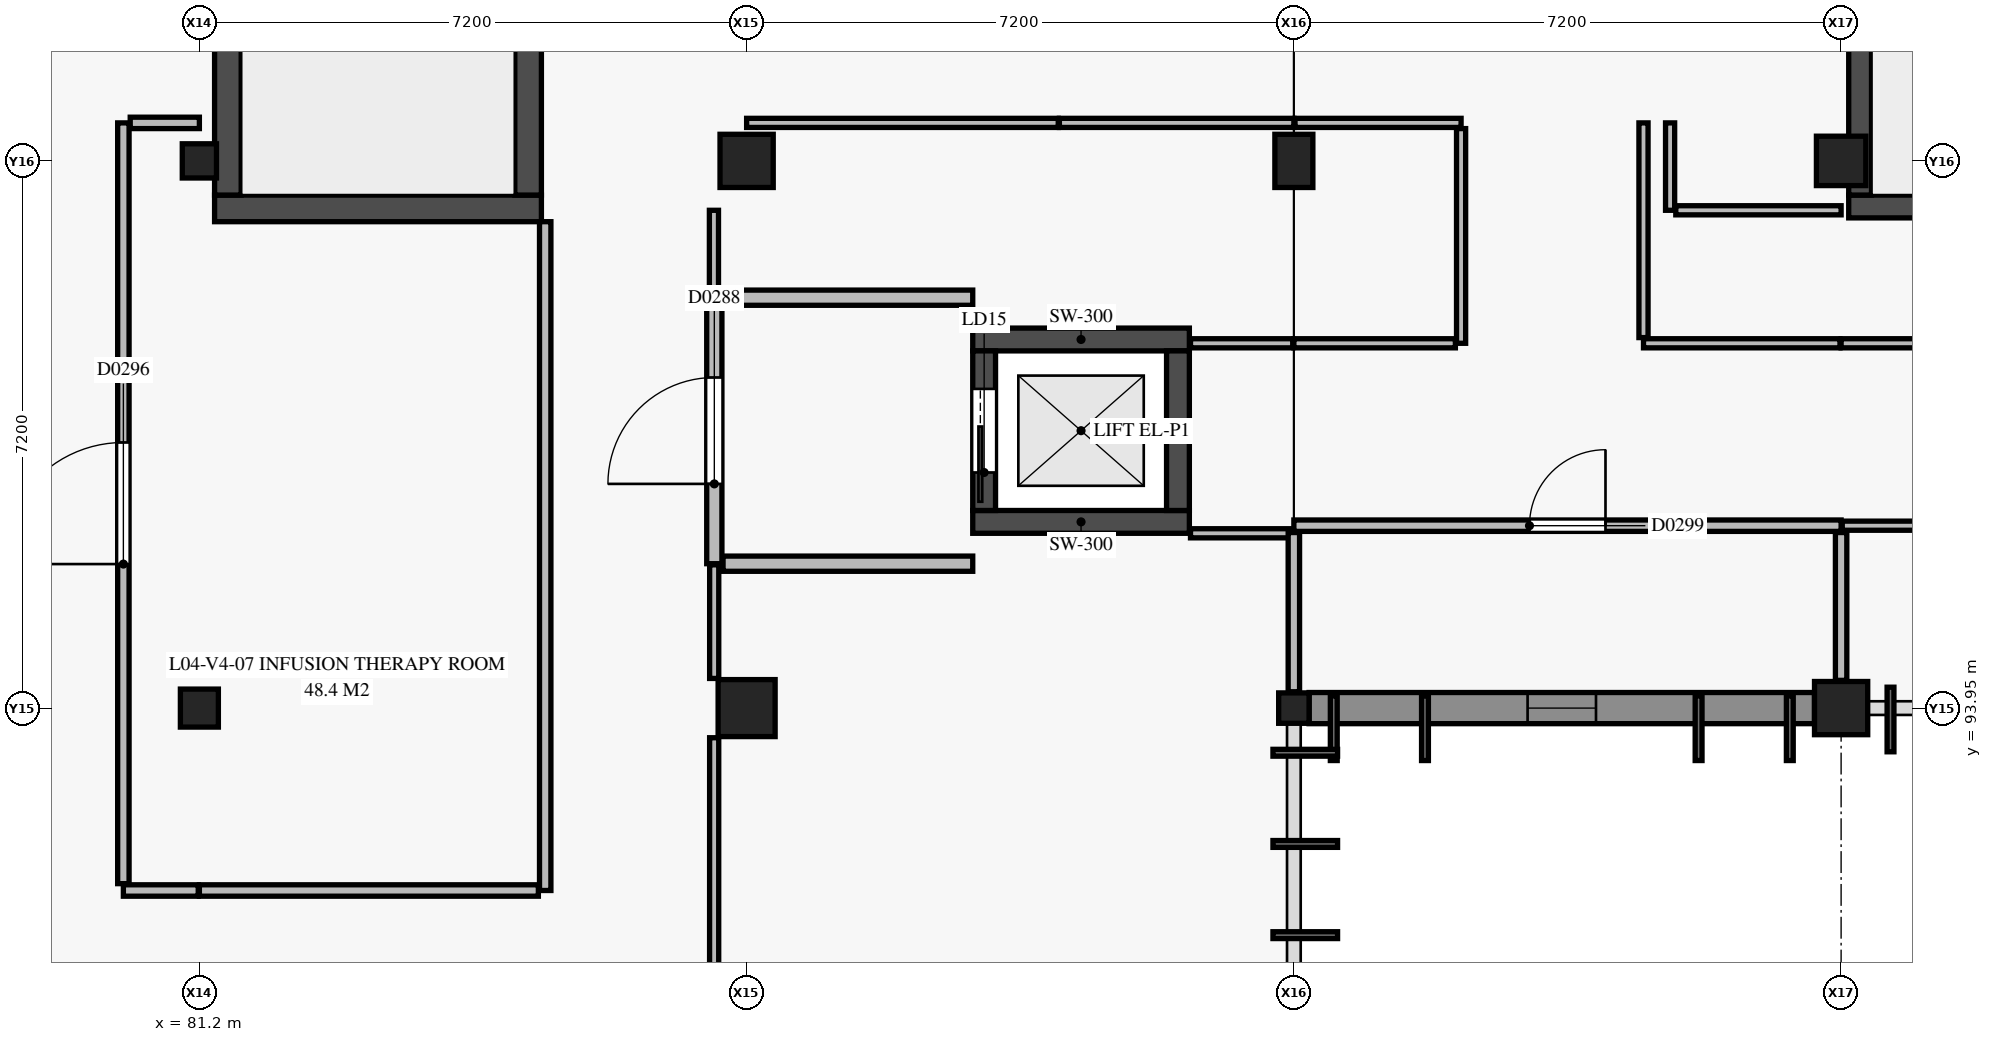
"""IFC4 building model, lengths in metres.
Left out: names, types, materials, properties, quantities, classifications, styles, units other than length and angle.
Written with IfcOpenShell. Run it as: python <this file> out.ifc"""

import sys

from ifc_helpers import new_model, si_unit, direction, frame, frame_2d, origin, origin_2d, place, context, subcontext, project, spatial, rectangle, extrude, element, fill, save


model = new_model("IFC4")
c1 = context("Model", 3, precision=1e-05, world=origin(), true_north=direction((0.0, 1.0)))
c2 = subcontext(c1, "Body", "Model", "MODEL_VIEW")
j1 = project(units=[si_unit("LENGTHUNIT", "METRE"), si_unit("PLANEANGLEUNIT", "RADIAN")], contexts=[c1])
p1 = place(None, origin())
s1 = spatial("IfcSite", under=j1, at=p1, CompositionType="ELEMENT")
p2 = place(p1, origin())
s2 = spatial("IfcBuilding", under=s1, at=p2, CompositionType="ELEMENT")
p3 = place(p2, frame((0.0, 0.0, 17.4)))
s3 = spatial("IfcBuildingStorey", under=s2, at=p3, CompositionType="ELEMENT", Elevation=17.4)
p4 = place(p3, frame((81.2, 93.95, 0.0), z_axis=(0.0, 0.0, 1.0), x_axis=(1.0, 0.0, 0.0)))
e1 = element("IfcColumn", 1, at=p4, inside=s3, PredefinedType="COLUMN", context=c2, shape_type="SweptSolid", body=[
    extrude(rectangle(XDim=0.5, YDim=0.5, at=origin_2d()), origin(), (0.0, 0.0, 1.0), 4.2),
])
p5 = place(p3, frame((81.2, 101.15, 0.0), z_axis=(0.0, 0.0, 1.0), x_axis=(1.0, 0.0, 0.0)))
e2 = element("IfcColumn", 2, at=p5, inside=s3, PredefinedType="COLUMN", context=c2, shape_type="SweptSolid", body=[
    extrude(rectangle(XDim=0.45, YDim=0.45, at=origin_2d()), origin(), (0.0, 0.0, 1.0), 4.2),
])
p6 = place(p3, frame((88.4, 93.95, 0.0), z_axis=(0.0, 0.0, 1.0), x_axis=(1.0, 0.0, 0.0)))
e3 = element("IfcColumn", 3, at=p6, inside=s3, PredefinedType="COLUMN", context=c2, shape_type="SweptSolid", body=[
    extrude(rectangle(XDim=0.75, YDim=0.75, at=origin_2d()), origin(), (0.0, 0.0, 1.0), 4.2),
])
p7 = place(p3, frame((88.4, 101.15, 0.0), z_axis=(0.0, 0.0, 1.0), x_axis=(1.0, 0.0, 0.0)))
e4 = element("IfcColumn", 4, at=p7, inside=s3, PredefinedType="COLUMN", context=c2, shape_type="SweptSolid", body=[
    extrude(rectangle(XDim=0.7, YDim=0.7, at=origin_2d()), origin(), (0.0, 0.0, 1.0), 4.2),
])
p8 = place(p3, frame((95.6, 93.95, 0.0), z_axis=(0.0, 0.0, 1.0), x_axis=(1.0, 0.0, 0.0)))
e5 = element("IfcColumn", 5, at=p8, inside=s3, PredefinedType="COLUMN", context=c2, shape_type="SweptSolid", body=[
    extrude(rectangle(XDim=0.4, YDim=0.4, at=origin_2d()), origin(), (0.0, 0.0, 1.0), 4.2),
])
p9 = place(p3, frame((95.6, 101.15, 0.0), z_axis=(0.0, 0.0, 1.0), x_axis=(1.0, 0.0, 0.0)))
e6 = element("IfcColumn", 6, at=p9, inside=s3, PredefinedType="COLUMN", context=c2, shape_type="SweptSolid", body=[
    extrude(rectangle(XDim=0.5, YDim=0.7, at=origin_2d()), origin(), (0.0, 0.0, 1.0), 4.2),
])
p10 = place(p3, frame((102.8, 93.95, 0.0), z_axis=(0.0, 0.0, 1.0), x_axis=(1.0, 0.0, 0.0)))
e7 = element("IfcColumn", 7, at=p10, inside=s3, PredefinedType="COLUMN", context=c2, shape_type="SweptSolid", body=[
    extrude(rectangle(XDim=0.7, YDim=0.7, at=origin_2d()), origin(), (0.0, 0.0, 1.0), 4.2),
])
p11 = place(p3, frame((102.8, 101.15, 0.0), z_axis=(0.0, 0.0, 1.0), x_axis=(1.0, 0.0, 0.0)))
e8 = element("IfcColumn", 8, at=p11, inside=s3, PredefinedType="COLUMN", context=c2, shape_type="SweptSolid", body=[
    extrude(rectangle(XDim=0.65, YDim=0.65, at=origin_2d()), origin(), (0.0, 0.0, 1.0), 4.2),
])
p12 = place(p3, frame((102.9, 100.55, 0.0), z_axis=(0.0, 0.0, 1.0), x_axis=(1.0, 0.0, 0.0)))
e9 = element("IfcWall", 9, at=p12, inside=s3, PredefinedType="SHEAR", context=c2, shape_type="SweptSolid", body=[
    extrude(rectangle(XDim=3.9, YDim=0.3, at=frame_2d((1.95, 0.0))), origin(), (0.0, 0.0, 1.0), 3.92),
])
p13 = place(p3, frame((103.05, 100.7, 0.0), z_axis=(0.0, 0.0, 1.0), x_axis=(0.0, 1.0, 0.0)))
e10 = element("IfcWall", 10, at=p13, inside=s3, PredefinedType="SHEAR", context=c2, shape_type="SweptSolid", body=[
    extrude(rectangle(XDim=7.3, YDim=0.3, at=frame_2d((3.65, 0.0))), origin(), (0.0, 0.0, 1.0), 3.92),
])
p14 = place(p13, frame((5.68, 0.0, 0.0)))
e11 = element("IfcOpeningElement", 11, at=p14, cuts=e10, PredefinedType="OPENING", context=c2, shape_type="SweptSolid", body=[
    extrude(rectangle(XDim=1.5, YDim=2.15, at=frame_2d((0.75, 1.075))), frame((0.0, 0.16, 0.0), z_axis=(0.0, -1.0, 0.0), x_axis=(1.0, 0.0, 0.0)), (0.0, 0.0, 1.0), 0.32),
])
p15 = place(p3, frame((81.4, 100.525, 0.0), z_axis=(0.0, 0.0, 1.0), x_axis=(1.0, 0.0, 0.0)))
e12 = element("IfcWall", 12, at=p15, inside=s3, PredefinedType="SHEAR", context=c2, shape_type="SweptSolid", body=[
    extrude(rectangle(XDim=4.3, YDim=0.35, at=frame_2d((2.15, 0.0))), origin(), (0.0, 0.0, 1.0), 3.92),
])
p16 = place(p3, frame((81.575, 100.7, 0.0), z_axis=(0.0, 0.0, 1.0), x_axis=(0.0, 1.0, 0.0)))
e13 = element("IfcWall", 13, at=p16, inside=s3, PredefinedType="SHEAR", context=c2, shape_type="SweptSolid", body=[
    extrude(rectangle(XDim=7.3, YDim=0.35, at=frame_2d((3.65, 0.0))), origin(), (0.0, 0.0, 1.0), 3.92),
])
p17 = place(p3, frame((85.525, 100.7, 0.0), z_axis=(0.0, 0.0, 1.0), x_axis=(0.0, 1.0, 0.0)))
e14 = element("IfcWall", 14, at=p17, inside=s3, PredefinedType="SHEAR", context=c2, shape_type="SweptSolid", body=[
    extrude(rectangle(XDim=7.3, YDim=0.35, at=frame_2d((3.65, 0.0))), origin(), (0.0, 0.0, 1.0), 3.92),
])
p18 = place(p17, frame((5.68, 0.0, 0.0)))
e15 = element("IfcOpeningElement", 15, at=p18, cuts=e14, PredefinedType="OPENING", context=c2, shape_type="SweptSolid", body=[
    extrude(rectangle(XDim=1.5, YDim=2.15, at=frame_2d((0.75, 1.075))), frame((0.0, 0.185, 0.0), z_axis=(0.0, -1.0, 0.0), x_axis=(1.0, 0.0, 0.0)), (0.0, 0.0, 1.0), 0.37),
])
for number, where, z_axis, x_axis in (
    (16, (91.375, 96.4, 0.0), (0.0, 0.0, 1.0), (1.0, 0.0, 0.0)),
    (17, (91.375, 98.8, 0.0), (0.0, 0.0, 1.0), (1.0, 0.0, 0.0)),
):
    element("IfcWall", number, at=place(p3, frame(where, z_axis=z_axis, x_axis=x_axis)), inside=s3, PredefinedType="SHEAR", context=c2, shape_type="SweptSolid", body=[
        extrude(rectangle(XDim=2.85, YDim=0.3, at=frame_2d((1.425, 0.0))), origin(), (0.0, 0.0, 1.0), 3.92),
    ])
p19 = place(p3, frame((91.525, 96.55, 0.0), z_axis=(0.0, 0.0, 1.0), x_axis=(0.0, 1.0, 0.0)))
e18 = element("IfcWall", 18, at=p19, inside=s3, PredefinedType="SHEAR", context=c2, shape_type="SweptSolid", body=[
    extrude(rectangle(XDim=2.1, YDim=0.3, at=frame_2d((1.05, 0.0))), origin(), (0.0, 0.0, 1.0), 3.92),
])
p20 = place(p19, frame((0.5, 0.0, 0.0)))
e19 = element("IfcOpeningElement", 19, at=p20, cuts=e18, PredefinedType="OPENING", context=c2, shape_type="SweptSolid", body=[
    extrude(rectangle(XDim=1.1, YDim=2.15, at=frame_2d((0.55, 1.075))), frame((0.0, 0.16, 0.0), z_axis=(0.0, -1.0, 0.0), x_axis=(1.0, 0.0, 0.0)), (0.0, 0.0, 1.0), 0.32),
])
p21 = place(p3, frame((94.075, 96.55, 0.0), z_axis=(0.0, 0.0, 1.0), x_axis=(0.0, 1.0, 0.0)))
e20 = element("IfcWall", 20, at=p21, inside=s3, PredefinedType="SHEAR", context=c2, shape_type="SweptSolid", body=[
    extrude(rectangle(XDim=2.1, YDim=0.3, at=frame_2d((1.05, 0.0))), origin(), (0.0, 0.0, 1.0), 3.92),
])
p22 = place(p3, frame((102.45, 93.95, 0.0), z_axis=(0.0, 0.0, 1.0), x_axis=(-1.0, 0.0, 0.0)))
e21 = element("IfcWall", 21, at=p22, inside=s3, PredefinedType="USERDEFINED", context=c2, shape_type="SweptSolid", body=[
    extrude(rectangle(XDim=6.65, YDim=0.41, at=frame_2d((3.325, 0.0))), origin(), (0.0, 0.0, 1.0), 3.1),
])
p23 = place(p22, frame((2.875, 0.0, 0.9)))
e22 = element("IfcOpeningElement", 22, at=p23, cuts=e21, PredefinedType="OPENING", context=c2, shape_type="SweptSolid", body=[
    extrude(rectangle(XDim=0.9, YDim=1.2, at=frame_2d((0.45, 0.6))), frame((0.0, 0.215, 0.0), z_axis=(0.0, -1.0, 0.0), x_axis=(1.0, 0.0, 0.0)), (0.0, 0.0, 1.0), 0.43),
])
p24 = place(p3, frame((87.975, 95.85, 0.0), z_axis=(0.0, 0.0, 1.0), x_axis=(0.0, 1.0, 0.0)))
e23 = element("IfcWall", 23, at=p24, inside=s3, PredefinedType="PARTITIONING", context=c2, shape_type="SweptSolid", body=[
    extrude(rectangle(XDim=3.5, YDim=0.2, at=frame_2d((1.75, 0.0))), origin(), (0.0, 0.0, 1.0), 3.445),
])
p25 = place(p24, frame((1.05, 0.0, 0.0)))
e24 = element("IfcOpeningElement", 24, at=p25, cuts=e23, PredefinedType="OPENING", context=c2, shape_type="SweptSolid", body=[
    extrude(rectangle(XDim=1.4, YDim=2.2, at=frame_2d((0.7, 1.1))), frame((0.0, 0.11, 0.0), z_axis=(0.0, -1.0, 0.0), x_axis=(1.0, 0.0, 0.0)), (0.0, 0.0, 1.0), 0.22),
])
for number, where, z_axis, x_axis in (
    (25, (88.09, 99.35, 0.0), (0.0, 0.0, 1.0), (1.0, 0.0, 0.0)),
    (26, (88.09, 95.85, 0.0), (0.0, 0.0, 1.0), (1.0, 0.0, 0.0)),
):
    element("IfcWall", number, at=place(p3, frame(where, z_axis=z_axis, x_axis=x_axis)), inside=s3, PredefinedType="PARTITIONING", context=c2, shape_type="SweptSolid", body=[
        extrude(rectangle(XDim=3.285, YDim=0.2, at=frame_2d((1.643, 0.0))), origin(), (0.0, 0.0, 1.0), 3.425),
    ])
p26 = place(p3, frame((85.75, 91.55, 0.0), z_axis=(0.0, 0.0, 1.0), x_axis=(0.0, 1.0, 0.0)))
e27 = element("IfcWall", 27, at=p26, inside=s3, PredefinedType="PARTITIONING", context=c2, shape_type="SweptSolid", body=[
    extrude(rectangle(XDim=8.8, YDim=0.15, at=frame_2d((4.4, 0.0))), origin(), (0.0, 0.0, 1.0), 3.385),
])
p27 = place(p3, frame((81.2, 91.55, 0.0), z_axis=(0.0, 0.0, 1.0), x_axis=(1.0, 0.0, 0.0)))
e28 = element("IfcWall", 28, at=p27, inside=s3, PredefinedType="PARTITIONING", context=c2, shape_type="SweptSolid", body=[
    extrude(rectangle(XDim=4.46, YDim=0.15, at=frame_2d((2.23, 0.0))), origin(), (0.0, 0.0, 1.0), 3.205),
])
p28 = place(p3, frame((80.2, 91.55, 0.0), z_axis=(0.0, 0.0, 1.0), x_axis=(1.0, 0.0, 0.0)))
e29 = element("IfcWall", 29, at=p28, inside=s3, PredefinedType="PARTITIONING", context=c2, shape_type="SweptSolid", body=[
    extrude(rectangle(XDim=0.985, YDim=0.15, at=frame_2d((0.493, 0.0))), origin(), (0.0, 0.0, 1.0), 3.205),
])
p29 = place(p3, frame((80.2, 91.64, 0.0), z_axis=(0.0, 0.0, 1.0), x_axis=(0.0, 1.0, 0.0)))
e30 = element("IfcWall", 30, at=p29, inside=s3, PredefinedType="PARTITIONING", context=c2, shape_type="SweptSolid", body=[
    extrude(rectangle(XDim=10.01, YDim=0.15, at=frame_2d((5.005, 0.0))), origin(), (0.0, 0.0, 1.0), 3.185),
])
p30 = place(p29, frame((4.205, 0.0, 0.0)))
e31 = element("IfcOpeningElement", 31, at=p30, cuts=e30, PredefinedType="OPENING", context=c2, shape_type="SweptSolid", body=[
    extrude(rectangle(XDim=1.6, YDim=2.25, at=frame_2d((0.8, 1.125))), frame((0.0, 0.085, 0.0), z_axis=(0.0, -1.0, 0.0), x_axis=(1.0, 0.0, 0.0)), (0.0, 0.0, 1.0), 0.17),
])
p31 = place(p3, frame((80.29, 101.65, 0.0), z_axis=(0.0, 0.0, 1.0), x_axis=(1.0, 0.0, 0.0)))
e32 = element("IfcWall", 32, at=p31, inside=s3, PredefinedType="PARTITIONING", context=c2, shape_type="SweptSolid", body=[
    extrude(rectangle(XDim=0.91, YDim=0.15, at=frame_2d((0.455, 0.0))), origin(), (0.0, 0.0, 1.0), 3.325),
])
p32 = place(p3, frame((95.6, 96.35, 0.0), z_axis=(0.0, 0.0, 1.0), x_axis=(1.0, 0.0, 0.0)))
e33 = element("IfcWall", 33, at=p32, inside=s3, PredefinedType="PARTITIONING", context=c2, shape_type="SweptSolid", body=[
    extrude(rectangle(XDim=7.2, YDim=0.15, at=frame_2d((3.6, 0.0))), origin(), (0.0, 0.0, 1.0), 3.325),
])
p33 = place(p32, frame((3.1, 0.0, 0.0)))
e34 = element("IfcOpeningElement", 34, at=p33, cuts=e33, PredefinedType="OPENING", context=c2, shape_type="SweptSolid", body=[
    extrude(rectangle(XDim=1.0, YDim=2.15, at=frame_2d((0.5, 1.075))), frame((0.0, 0.085, 0.0), z_axis=(0.0, -1.0, 0.0), x_axis=(1.0, 0.0, 0.0)), (0.0, 0.0, 1.0), 0.17),
])
p34 = place(p3, frame((87.97, 74.55, 0.0), z_axis=(0.0, 0.0, 1.0), x_axis=(0.000166955626, 0.999999986063, 0.0)))
e35 = element("IfcWall", 35, at=p34, inside=s3, PredefinedType="PARTITIONING", context=c2, shape_type="SweptSolid", body=[
    extrude(rectangle(XDim=19.01, YDim=0.12, at=frame_2d((9.505, 0.0))), origin(), (0.0, 0.0, 1.0), 3.205),
])
p35 = place(p34, frame((8.98, 0.0, 0.0)))
e36 = element("IfcOpeningElement", 36, at=p35, cuts=e35, PredefinedType="OPENING", context=c2, shape_type="SweptSolid", body=[
    extrude(rectangle(XDim=1.05, YDim=2.15, at=frame_2d((0.525, 1.075))), frame((0.0, 0.07, 0.0), z_axis=(0.0, -1.0, 0.0), x_axis=(1.0, 0.0, 0.0)), (0.0, 0.0, 1.0), 0.14),
])
p36 = place(p3, frame((87.973, 94.34, 0.0), z_axis=(0.0, 0.0, 1.0), x_axis=(0.000163318632, 0.999999986664, 0.0)))
e37 = element("IfcWall", 37, at=p36, inside=s3, PredefinedType="PARTITIONING", context=c2, shape_type="SweptSolid", body=[
    extrude(rectangle(XDim=1.495, YDim=0.12, at=frame_2d((0.748, 0.0))), origin(), (0.0, 0.0, 1.0), 3.92),
])
p37 = place(p3, frame((87.97, 99.365, 0.0), z_axis=(0.0, 0.0, 1.0), x_axis=(0.0, 1.0, 0.0)))
e38 = element("IfcWall", 38, at=p37, inside=s3, PredefinedType="PARTITIONING", context=c2, shape_type="SweptSolid", body=[
    extrude(rectangle(XDim=1.135, YDim=0.12, at=frame_2d((0.567, 0.0))), origin(), (0.0, 0.0, 1.0), 3.92),
])
p38 = place(p3, frame((88.4, 101.65, 0.0), z_axis=(0.0, 0.0, 1.0), x_axis=(1.0, 0.0, 0.0)))
e39 = element("IfcWall", 39, at=p38, inside=s3, PredefinedType="PARTITIONING", context=c2, shape_type="SweptSolid", body=[
    extrude(rectangle(XDim=4.1, YDim=0.12, at=frame_2d((2.05, 0.0))), origin(), (0.0, 0.0, 1.0), 3.185),
])
p39 = place(p3, frame((92.515, 101.65, 0.0), z_axis=(0.0, 0.0, 1.0), x_axis=(1.0, 0.0, 0.0)))
e40 = element("IfcWall", 40, at=p39, inside=s3, PredefinedType="PARTITIONING", context=c2, shape_type="SweptSolid", body=[
    extrude(rectangle(XDim=3.085, YDim=0.12, at=frame_2d((1.542, 0.0))), origin(), (0.0, 0.0, 1.0), 3.325),
])
p40 = place(p3, frame((95.615, 101.65, 0.0), z_axis=(0.0, 0.0, 1.0), x_axis=(1.0, 0.0, 0.0)))
e41 = element("IfcWall", 41, at=p40, inside=s3, PredefinedType="PARTITIONING", context=c2, shape_type="SweptSolid", body=[
    extrude(rectangle(XDim=2.185, YDim=0.12, at=frame_2d((1.093, 0.0))), origin(), (0.0, 0.0, 1.0), 3.325),
])
p41 = place(p3, frame((97.8, 98.75, 0.0), z_axis=(0.0, 0.0, 1.0), x_axis=(0.0, 1.0, 0.0)))
e42 = element("IfcWall", 42, at=p41, inside=s3, PredefinedType="PARTITIONING", context=c2, shape_type="SweptSolid", body=[
    extrude(rectangle(XDim=2.825, YDim=0.12, at=frame_2d((1.413, 0.0))), origin(), (0.0, 0.0, 1.0), 3.325),
])
p42 = place(p3, frame((95.6, 98.75, 0.0), z_axis=(0.0, 0.0, 1.0), x_axis=(1.0, 0.0, 0.0)))
e43 = element("IfcWall", 43, at=p42, inside=s3, PredefinedType="PARTITIONING", context=c2, shape_type="SweptSolid", body=[
    extrude(rectangle(XDim=2.125, YDim=0.12, at=frame_2d((1.062, 0.0))), origin(), (0.0, 0.0, 1.0), 3.325),
])
for number, where, z_axis, x_axis in (
    (44, (94.24, 98.75, 0.0), (0.0, 0.0, 1.0), (1.0, 0.0, 0.0)),
    (45, (94.24, 96.25, 0.0), (0.0, 0.0, 1.0), (1.0, 0.0, 0.0)),
):
    element("IfcWall", number, at=place(p3, frame(where, z_axis=z_axis, x_axis=x_axis)), inside=s3, PredefinedType="PARTITIONING", context=c2, shape_type="SweptSolid", body=[
        extrude(rectangle(XDim=1.345, YDim=0.12, at=frame_2d((0.672, 0.0))), origin(), (0.0, 0.0, 1.0), 3.325),
    ])
p43 = place(p3, frame((100.55, 100.5, 0.0), z_axis=(0.0, 0.0, 1.0), x_axis=(0.0, 1.0, 0.0)))
e46 = element("IfcWall", 46, at=p43, inside=s3, PredefinedType="PARTITIONING", context=c2, shape_type="SweptSolid", body=[
    extrude(rectangle(XDim=1.15, YDim=0.12, at=frame_2d((0.575, 0.0))), origin(), (0.0, 0.0, 1.0), 3.325),
])
p44 = place(p3, frame((100.625, 100.5, 0.0), z_axis=(0.0, 0.0, 1.0), x_axis=(1.0, 0.0, 0.0)))
e47 = element("IfcWall", 47, at=p44, inside=s3, PredefinedType="PARTITIONING", context=c2, shape_type="SweptSolid", body=[
    extrude(rectangle(XDim=2.175, YDim=0.12, at=frame_2d((1.087, 0.0))), origin(), (0.0, 0.0, 1.0), 3.325),
])
p45 = place(p3, frame((102.815, 96.35, 0.0), z_axis=(0.0, 0.0, 1.0), x_axis=(1.0, 0.0, 0.0)))
e48 = element("IfcWall", 48, at=p45, inside=s3, PredefinedType="PARTITIONING", context=c2, shape_type="SweptSolid", body=[
    extrude(rectangle(XDim=5.685, YDim=0.12, at=frame_2d((2.843, 0.0))), origin(), (0.0, 0.0, 1.0), 3.325),
])
p46 = place(p45, frame((2.367, 0.0, 0.0)))
e49 = element("IfcOpeningElement", 49, at=p46, cuts=e48, PredefinedType="OPENING", context=c2, shape_type="SweptSolid", body=[
    extrude(rectangle(XDim=0.95, YDim=2.1, at=frame_2d((0.475, 1.05))), frame((0.0, 0.07, 0.0), z_axis=(0.0, -1.0, 0.0), x_axis=(1.0, 0.0, 0.0)), (0.0, 0.0, 1.0), 0.14),
])
p47 = place(p3, frame((102.8, 98.75, 0.0), z_axis=(0.0, 0.0, 1.0), x_axis=(1.0, 0.0, 0.0)))
e50 = element("IfcWall", 50, at=p47, inside=s3, PredefinedType="PARTITIONING", context=c2, shape_type="SweptSolid", body=[
    extrude(rectangle(XDim=4.035, YDim=0.12, at=frame_2d((2.018, 0.0))), origin(), (0.0, 0.0, 1.0), 3.325),
])
p48 = place(p3, frame((100.2, 98.75, 0.0), z_axis=(0.0, 0.0, 1.0), x_axis=(1.0, 0.0, 0.0)))
e51 = element("IfcWall", 51, at=p48, inside=s3, PredefinedType="PARTITIONING", context=c2, shape_type="SweptSolid", body=[
    extrude(rectangle(XDim=2.585, YDim=0.12, at=frame_2d((1.292, 0.0))), origin(), (0.0, 0.0, 1.0), 3.325),
])
p49 = place(p3, frame((100.2, 98.825, 0.0), z_axis=(0.0, 0.0, 1.0), x_axis=(0.0, 1.0, 0.0)))
e52 = element("IfcWall", 52, at=p49, inside=s3, PredefinedType="PARTITIONING", context=c2, shape_type="SweptSolid", body=[
    extrude(rectangle(XDim=2.825, YDim=0.12, at=frame_2d((1.413, 0.0))), origin(), (0.0, 0.0, 1.0), 3.325),
])
p50 = place(p3, frame((95.6, 94.165, 0.0), z_axis=(0.0, 0.0, 1.0), x_axis=(0.0, 1.0, 0.0)))
e53 = element("IfcWall", 53, at=p50, inside=s3, PredefinedType="PARTITIONING", context=c2, shape_type="SweptSolid", body=[
    extrude(rectangle(XDim=2.095, YDim=0.15, at=frame_2d((1.047, 0.0))), origin(), (0.0, 0.0, 1.0), 3.325),
])
p51 = place(p3, frame((102.8, 94.315, 0.0), z_axis=(0.0, 0.0, 1.0), x_axis=(0.0, 1.0, 0.0)))
e54 = element("IfcWall", 54, at=p51, inside=s3, PredefinedType="PARTITIONING", context=c2, shape_type="SweptSolid", body=[
    extrude(rectangle(XDim=1.945, YDim=0.15, at=frame_2d((0.973, 0.0))), origin(), (0.0, 0.0, 1.0), 3.325),
])
p52 = place(p23, origin())
e55 = element("IfcWindow", 55, at=p52, inside=s3, PartitioningType="SINGLE_PANEL", PredefinedType="WINDOW", context=c2, shape_type="SweptSolid", body=[
    extrude(rectangle(XDim=0.9, YDim=1.2, at=frame_2d((0.45, 0.6))), frame((0.0, 0.03, 0.0), z_axis=(0.0, -1.0, 0.0), x_axis=(1.0, 0.0, 0.0)), (0.0, 0.0, 1.0), 0.06),
])
fill(e22, e55)
p53 = place(p20, origin())
e56 = element("IfcDoor", 56, at=p53, inside=s3, OperationType="SLIDING_TO_LEFT", PredefinedType="DOOR", context=c2, shape_type="SweptSolid", body=[
    extrude(rectangle(XDim=1.1, YDim=2.15, at=frame_2d((0.55, 1.075))), frame((0.0, 0.025, 0.0), z_axis=(0.0, -1.0, 0.0), x_axis=(1.0, 0.0, 0.0)), (0.0, 0.0, 1.0), 0.05),
])
fill(e19, e56)
p54 = place(p25, origin())
e57 = element("IfcDoor", 57, at=p54, inside=s3, OperationType="SINGLE_SWING_LEFT", PredefinedType="DOOR", context=c2, shape_type="SweptSolid", body=[
    extrude(rectangle(XDim=1.4, YDim=2.2, at=frame_2d((0.7, 1.1))), frame((0.0, 0.025, 0.0), z_axis=(0.0, -1.0, 0.0), x_axis=(1.0, 0.0, 0.0)), (0.0, 0.0, 1.0), 0.05),
])
fill(e24, e57)
p55 = place(p30, origin())
e58 = element("IfcDoor", 58, at=p55, inside=s3, OperationType="SINGLE_SWING_LEFT", PredefinedType="DOOR", context=c2, shape_type="SweptSolid", body=[
    extrude(rectangle(XDim=1.6, YDim=2.25, at=frame_2d((0.8, 1.125))), frame((0.0, 0.025, 0.0), z_axis=(0.0, -1.0, 0.0), x_axis=(1.0, 0.0, 0.0)), (0.0, 0.0, 1.0), 0.05),
])
fill(e31, e58)
p56 = place(p33, origin())
e59 = element("IfcDoor", 59, at=p56, inside=s3, OperationType="SINGLE_SWING_RIGHT", PredefinedType="DOOR", context=c2, shape_type="SweptSolid", body=[
    extrude(rectangle(XDim=1.0, YDim=2.15, at=frame_2d((0.5, 1.075))), frame((0.0, 0.025, 0.0), z_axis=(0.0, -1.0, 0.0), x_axis=(1.0, 0.0, 0.0)), (0.0, 0.0, 1.0), 0.05),
])
fill(e34, e59)
save(model, sys.argv[1])
